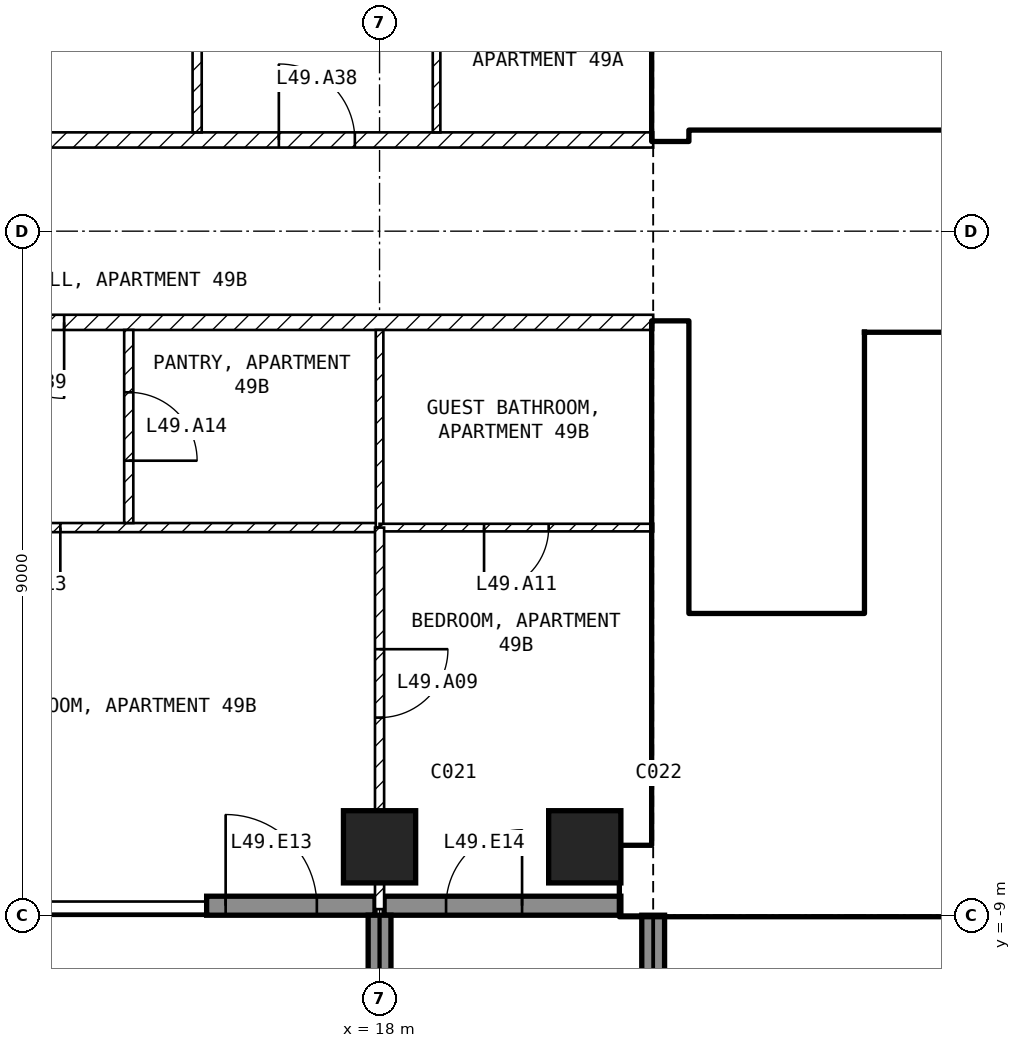
"""IFC4 building model, lengths in metres.
Left out: names, types, materials, properties, quantities, classifications, styles, units other than length and angle.
Written with IfcOpenShell. Run it as: python <this file> out.ifc"""

import sys

from ifc_helpers import new_model, si_unit, direction, frame, frame_2d, origin, origin_2d, place, context, subcontext, project, spatial, rectangle, extrude, element, fill, save


model = new_model("IFC4")
c1 = context("Model", 3, precision=1e-05, world=origin(), true_north=direction((0.0, 1.0)))
c2 = subcontext(c1, "Body", "Model", "MODEL_VIEW")
j1 = project(units=[si_unit("LENGTHUNIT", "METRE"), si_unit("PLANEANGLEUNIT", "RADIAN")], contexts=[c1])
p1 = place(None, origin())
s1 = spatial("IfcSite", under=j1, at=p1, CompositionType="ELEMENT")
p2 = place(p1, origin())
s2 = spatial("IfcBuilding", under=s1, at=p2, CompositionType="ELEMENT")
p3 = place(p2, frame((0.0, 0.0, 198.1)))
s3 = spatial("IfcBuildingStorey", under=s2, at=p3, CompositionType="ELEMENT", Elevation=198.1)
for number, where, z_axis, x_axis in (
    (1, (18.0, -8.1, -0.25), (0.0, 0.0, 1.0), (1.0, 0.0, 0.0)),
    (2, (20.7, -8.1, -0.25), (0.0, 0.0, 1.0), (1.0, 0.0, 0.0)),
):
    element("IfcColumn", number, at=place(p3, frame(where, z_axis=z_axis, x_axis=x_axis)), inside=s3, PredefinedType="COLUMN", context=c2, shape_type="SweptSolid", body=[
        extrude(rectangle(XDim=0.95, YDim=0.95, at=origin_2d()), origin(), (0.0, 0.0, 1.0), 3.5),
    ])
p4 = place(p3, frame((15.725, -8.875, 0.0), z_axis=(0.0, 0.0, 1.0), x_axis=(1.0, 0.0, 0.0)))
e3 = element("IfcWall", 3, at=p4, inside=s3, PredefinedType="SOLIDWALL", context=c2, shape_type="SweptSolid", body=[
    extrude(rectangle(XDim=2.215, YDim=0.25, at=frame_2d((1.107, 0.0))), origin(), (0.0, 0.0, 1.0), 3.25),
])
p5 = place(p4, frame((0.25, 0.0, 0.0)))
e4 = element("IfcOpeningElement", 4, at=p5, cuts=e3, PredefinedType="OPENING", context=c2, shape_type="SweptSolid", body=[
    extrude(rectangle(XDim=1.2, YDim=2.4, at=frame_2d((0.6, 1.2))), frame((0.0, 0.135, 0.0), z_axis=(0.0, -1.0, 0.0), x_axis=(1.0, 0.0, 0.0)), (0.0, 0.0, 1.0), 0.27),
])
p6 = place(p3, frame((18.06, -8.875, 0.0), z_axis=(0.0, 0.0, 1.0), x_axis=(1.0, 0.0, 0.0)))
e5 = element("IfcWall", 5, at=p6, inside=s3, PredefinedType="SOLIDWALL", context=c2, shape_type="SweptSolid", body=[
    extrude(rectangle(XDim=3.115, YDim=0.25, at=frame_2d((1.558, 0.0))), origin(), (0.0, 0.0, 1.0), 3.25),
])
p7 = place(p6, frame((0.815, 0.0, 0.0)))
e6 = element("IfcOpeningElement", 6, at=p7, cuts=e5, PredefinedType="OPENING", context=c2, shape_type="SweptSolid", body=[
    extrude(rectangle(XDim=1.0, YDim=2.4, at=frame_2d((0.5, 1.2))), frame((0.0, 0.135, 0.0), z_axis=(0.0, -1.0, 0.0), x_axis=(1.0, 0.0, 0.0)), (0.0, 0.0, 1.0), 0.27),
])
for number, where, z_axis, x_axis in (
    (7, (18.0, -9.0, 0.0), (0.0, 0.0, 1.0), (0.0, -1.0, 0.0)),
    (8, (21.6, -9.0, 0.0), (0.0, 0.0, 1.0), (0.0, -1.0, 0.0)),
):
    element("IfcWall", number, at=place(p3, frame(where, z_axis=z_axis, x_axis=x_axis)), inside=s3, PredefinedType="SOLIDWALL", context=c2, shape_type="SweptSolid", body=[
        extrude(rectangle(XDim=2.7, YDim=0.3, at=frame_2d((1.35, 0.0))), origin(), (0.0, 0.0, 1.0), 3.25),
    ])
p8 = place(p3, frame((21.175, -8.55, 0.0), z_axis=(0.0, 0.0, 1.0), x_axis=(1.0, 0.0, 0.0)))
e9 = element("IfcWall", 9, at=p8, inside=s3, PredefinedType="SHEAR", context=c2, shape_type="SweptSolid", body=[
    extrude(rectangle(XDim=9.025, YDim=0.9, at=frame_2d((4.512, 0.0))), origin(), (0.0, 0.0, 1.0), 3.25),
])
for number, where, z_axis, x_axis in (
    (10, (21.825, -8.1, 0.0), (0.0, 0.0, 1.0), (0.0, 1.0, 0.0)),
    (11, (21.825, 1.2, 0.0), (0.0, 0.0, 1.0), (0.0, 1.0, 0.0)),
):
    element("IfcWall", number, at=place(p3, frame(where, z_axis=z_axis, x_axis=x_axis)), inside=s3, PredefinedType="SHEAR", context=c2, shape_type="SweptSolid", body=[
        extrude(rectangle(XDim=6.9, YDim=0.45, at=frame_2d((3.45, 0.0))), origin(), (0.0, 0.0, 1.0), 3.25),
    ])
p9 = place(p3, frame((22.05, 1.45, 0.0), z_axis=(0.0, 0.0, 1.0), x_axis=(1.0, 0.0, 0.0)))
e12 = element("IfcWall", 12, at=p9, inside=s3, PredefinedType="SOLIDWALL", context=c2, shape_type="SweptSolid", body=[
    extrude(rectangle(XDim=11.15, YDim=0.2, at=frame_2d((5.575, 0.0))), origin(), (0.0, 0.0, 1.0), 3.25),
])
p10 = place(p9, frame((0.75, 0.0, 0.0)))
e13 = element("IfcOpeningElement", 13, at=p10, cuts=e12, PredefinedType="OPENING", context=c2, shape_type="SweptSolid", body=[
    extrude(rectangle(XDim=1.0, YDim=2.1, at=frame_2d((0.5, 1.05))), frame((0.0, 0.11, 0.0), z_axis=(0.0, -1.0, 0.0), x_axis=(1.0, 0.0, 0.0)), (0.0, 0.0, 1.0), 0.22),
])
p11 = place(p9, frame((3.25, 0.0, 0.0)))
e14 = element("IfcOpeningElement", 14, at=p11, cuts=e12, PredefinedType="OPENING", context=c2, shape_type="SweptSolid", body=[
    extrude(rectangle(XDim=1.0, YDim=2.1, at=frame_2d((0.5, 1.05))), frame((0.0, 0.11, 0.0), z_axis=(0.0, -1.0, 0.0), x_axis=(1.0, 0.0, 0.0)), (0.0, 0.0, 1.0), 0.22),
])
p12 = place(p9, frame((9.15, 0.0, 0.0)))
e15 = element("IfcOpeningElement", 15, at=p12, cuts=e12, PredefinedType="OPENING", context=c2, shape_type="SweptSolid", body=[
    extrude(rectangle(XDim=0.9, YDim=2.1, at=frame_2d((0.45, 1.05))), frame((0.0, 0.11, 0.0), z_axis=(0.0, -1.0, 0.0), x_axis=(1.0, 0.0, 0.0)), (0.0, 0.0, 1.0), 0.22),
])
p13 = place(p3, frame((24.5, -5.05, 0.0), z_axis=(0.0, 0.0, 1.0), x_axis=(0.0, 1.0, 0.0)))
e16 = element("IfcWall", 16, at=p13, inside=s3, PredefinedType="SOLIDWALL", context=c2, shape_type="SweptSolid", body=[
    extrude(rectangle(XDim=3.7, YDim=0.2, at=frame_2d((1.85, 0.0))), origin(), (0.0, 0.0, 1.0), 3.25),
])
p14 = place(p13, frame((0.1, 0.0, 0.0)))
e17 = element("IfcOpeningElement", 17, at=p14, cuts=e16, PredefinedType="OPENING", context=c2, shape_type="SweptSolid", body=[
    extrude(rectangle(XDim=0.8, YDim=2.1, at=frame_2d((0.4, 1.05))), frame((0.0, 0.11, 0.0), z_axis=(0.0, -1.0, 0.0), x_axis=(1.0, 0.0, 0.0)), (0.0, 0.0, 1.0), 0.22),
])
p15 = place(p3, frame((22.05, -5.15, 0.0), z_axis=(0.0, 0.0, 1.0), x_axis=(1.0, 0.0, 0.0)))
e18 = element("IfcWall", 18, at=p15, inside=s3, PredefinedType="SOLIDWALL", context=c2, shape_type="SweptSolid", body=[
    extrude(rectangle(XDim=6.3, YDim=0.2, at=frame_2d((3.15, 0.0))), origin(), (0.0, 0.0, 1.0), 3.25),
])
p16 = place(p15, frame((0.2, 0.0, 0.0)))
e19 = element("IfcOpeningElement", 19, at=p16, cuts=e18, PredefinedType="OPENING", context=c2, shape_type="SweptSolid", body=[
    extrude(rectangle(XDim=1.0, YDim=2.1, at=frame_2d((0.5, 1.05))), frame((0.0, 0.11, 0.0), z_axis=(0.0, -1.0, 0.0), x_axis=(1.0, 0.0, 0.0)), (0.0, 0.0, 1.0), 0.22),
])
p17 = place(p3, frame((24.6, -1.45, 0.0), z_axis=(0.0, 0.0, 1.0), x_axis=(1.0, 0.0, 0.0)))
e20 = element("IfcWall", 20, at=p17, inside=s3, PredefinedType="SOLIDWALL", context=c2, shape_type="SweptSolid", body=[
    extrude(rectangle(XDim=8.6, YDim=0.2, at=frame_2d((4.3, 0.0))), origin(), (0.0, 0.0, 1.0), 3.25),
])
p18 = place(p17, frame((0.4, 0.0, 0.0)))
e21 = element("IfcOpeningElement", 21, at=p18, cuts=e20, PredefinedType="OPENING", context=c2, shape_type="SweptSolid", body=[
    extrude(rectangle(XDim=1.0, YDim=2.1, at=frame_2d((0.5, 1.05))), frame((0.0, 0.11, 0.0), z_axis=(0.0, -1.0, 0.0), x_axis=(1.0, 0.0, 0.0)), (0.0, 0.0, 1.0), 0.22),
])
p19 = place(p17, frame((2.4, 0.0, 0.0)))
e22 = element("IfcOpeningElement", 22, at=p19, cuts=e20, PredefinedType="OPENING", context=c2, shape_type="SweptSolid", body=[
    extrude(rectangle(XDim=1.0, YDim=2.1, at=frame_2d((0.5, 1.05))), frame((0.0, 0.11, 0.0), z_axis=(0.0, -1.0, 0.0), x_axis=(1.0, 0.0, 0.0)), (0.0, 0.0, 1.0), 0.22),
])
p20 = place(p17, frame((4.4, 0.0, 0.0)))
e23 = element("IfcOpeningElement", 23, at=p20, cuts=e20, PredefinedType="OPENING", context=c2, shape_type="SweptSolid", body=[
    extrude(rectangle(XDim=1.0, YDim=2.1, at=frame_2d((0.5, 1.05))), frame((0.0, 0.11, 0.0), z_axis=(0.0, -1.0, 0.0), x_axis=(1.0, 0.0, 0.0)), (0.0, 0.0, 1.0), 0.22),
])
p21 = place(p17, frame((6.85, 0.0, 0.0)))
e24 = element("IfcOpeningElement", 24, at=p21, cuts=e20, PredefinedType="OPENING", context=c2, shape_type="SweptSolid", body=[
    extrude(rectangle(XDim=0.9, YDim=2.1, at=frame_2d((0.45, 1.05))), frame((0.0, 0.11, 0.0), z_axis=(0.0, -1.0, 0.0), x_axis=(1.0, 0.0, 0.0)), (0.0, 0.0, 1.0), 0.22),
])
p22 = place(p3, frame((24.6, -3.95, 0.0), z_axis=(0.0, 0.0, 1.0), x_axis=(1.0, 0.0, 0.0)))
e25 = element("IfcWall", 25, at=p22, inside=s3, PredefinedType="SOLIDWALL", context=c2, shape_type="SweptSolid", body=[
    extrude(rectangle(XDim=8.6, YDim=0.2, at=frame_2d((4.3, 0.0))), origin(), (0.0, 0.0, 1.0), 3.25),
])
p23 = place(p3, frame((4.4, 1.2, 0.0), z_axis=(0.0, 0.0, 1.0), x_axis=(1.0, 0.0, 0.0)))
e26 = element("IfcWall", 26, at=p23, inside=s3, PredefinedType="PARTITIONING", context=c2, shape_type="SweptSolid", body=[
    extrude(rectangle(XDim=17.2, YDim=0.2, at=frame_2d((8.6, 0.0))), origin(), (0.0, 0.0, 1.0), 3.25),
])
p24 = place(p23, frame((12.275, 0.0, 0.0)))
e27 = element("IfcOpeningElement", 27, at=p24, cuts=e26, PredefinedType="OPENING", context=c2, shape_type="SweptSolid", body=[
    extrude(rectangle(XDim=1.0, YDim=2.1, at=frame_2d((0.5, 1.05))), frame((0.0, 0.11, 0.0), z_axis=(0.0, -1.0, 0.0), x_axis=(1.0, 0.0, 0.0)), (0.0, 0.0, 1.0), 0.22),
])
p25 = place(p3, frame((21.6, -1.2, 0.0), z_axis=(0.0, 0.0, 1.0), x_axis=(-1.0, 0.0, 0.0)))
e28 = element("IfcWall", 28, at=p25, inside=s3, PredefinedType="PARTITIONING", context=c2, shape_type="SweptSolid", body=[
    extrude(rectangle(XDim=17.2, YDim=0.2, at=frame_2d((8.6, 0.0))), origin(), (0.0, 0.0, 1.0), 3.25),
])
p26 = place(p25, frame((7.75, 0.0, 0.0)))
e29 = element("IfcOpeningElement", 29, at=p26, cuts=e28, PredefinedType="OPENING", context=c2, shape_type="SweptSolid", body=[
    extrude(rectangle(XDim=1.0, YDim=2.1, at=frame_2d((0.5, 1.05))), frame((0.0, 0.11, 0.0), z_axis=(0.0, -1.0, 0.0), x_axis=(1.0, 0.0, 0.0)), (0.0, 0.0, 1.0), 0.22),
])
p27 = place(p3, frame((15.6, 4.74, 0.0), z_axis=(0.0, 0.0, 1.0), x_axis=(0.0, -1.0, 0.0)))
e30 = element("IfcWall", 30, at=p27, inside=s3, PredefinedType="PARTITIONING", context=c2, shape_type="SweptSolid", body=[
    extrude(rectangle(XDim=3.44, YDim=0.12, at=frame_2d((1.72, 0.0))), origin(), (0.0, 0.0, 1.0), 3.25),
])
p28 = place(p27, frame((1.27, 0.0, 0.0)))
e31 = element("IfcOpeningElement", 31, at=p28, cuts=e30, PredefinedType="OPENING", context=c2, shape_type="SweptSolid", body=[
    extrude(rectangle(XDim=0.9, YDim=2.1, at=frame_2d((0.45, 1.05))), frame((0.0, 0.07, 0.0), z_axis=(0.0, -1.0, 0.0), x_axis=(1.0, 0.0, 0.0)), (0.0, 0.0, 1.0), 0.14),
])
p29 = place(p3, frame((18.75, 4.74, 0.0), z_axis=(0.0, 0.0, 1.0), x_axis=(0.0, -1.0, 0.0)))
e32 = element("IfcWall", 32, at=p29, inside=s3, PredefinedType="PARTITIONING", context=c2, shape_type="SweptSolid", body=[
    extrude(rectangle(XDim=3.44, YDim=0.1, at=frame_2d((1.72, 0.0))), origin(), (0.0, 0.0, 1.0), 3.25),
])
p30 = place(p29, frame((1.295, 0.0, 0.0)))
e33 = element("IfcOpeningElement", 33, at=p30, cuts=e32, PredefinedType="OPENING", context=c2, shape_type="SweptSolid", body=[
    extrude(rectangle(XDim=0.85, YDim=2.1, at=frame_2d((0.425, 1.05))), frame((0.0, 0.06, 0.0), z_axis=(0.0, -1.0, 0.0), x_axis=(1.0, 0.0, 0.0)), (0.0, 0.0, 1.0), 0.12),
])
p31 = place(p3, frame((18.0, -3.9, 0.0), z_axis=(0.0, 0.0, 1.0), x_axis=(-1.0, 0.0, 0.0)))
e34 = element("IfcWall", 34, at=p31, inside=s3, PredefinedType="PARTITIONING", context=c2, shape_type="SweptSolid", body=[
    extrude(rectangle(XDim=9.06, YDim=0.12, at=frame_2d((4.53, 0.0))), origin(), (0.0, 0.0, 1.0), 3.25),
])
p32 = place(p31, frame((4.2, 0.0, 0.0)))
e35 = element("IfcOpeningElement", 35, at=p32, cuts=e34, PredefinedType="OPENING", context=c2, shape_type="SweptSolid", body=[
    extrude(rectangle(XDim=0.9, YDim=2.1, at=frame_2d((0.45, 1.05))), frame((0.0, 0.07, 0.0), z_axis=(0.0, -1.0, 0.0), x_axis=(1.0, 0.0, 0.0)), (0.0, 0.0, 1.0), 0.14),
])
p33 = place(p3, frame((14.7, -1.3, 0.0), z_axis=(0.0, 0.0, 1.0), x_axis=(0.0, -1.0, 0.0)))
e36 = element("IfcWall", 36, at=p33, inside=s3, PredefinedType="PARTITIONING", context=c2, shape_type="SweptSolid", body=[
    extrude(rectangle(XDim=2.54, YDim=0.12, at=frame_2d((1.27, 0.0))), origin(), (0.0, 0.0, 1.0), 3.25),
])
p34 = place(p33, frame((0.82, 0.0, 0.0)))
e37 = element("IfcOpeningElement", 37, at=p34, cuts=e36, PredefinedType="OPENING", context=c2, shape_type="SweptSolid", body=[
    extrude(rectangle(XDim=0.9, YDim=2.1, at=frame_2d((0.45, 1.05))), frame((0.0, 0.07, 0.0), z_axis=(0.0, -1.0, 0.0), x_axis=(1.0, 0.0, 0.0)), (0.0, 0.0, 1.0), 0.14),
])
p35 = place(p3, frame((18.0, -1.3, 0.0), z_axis=(0.0, 0.0, 1.0), x_axis=(0.0, -1.0, 0.0)))
e38 = element("IfcWall", 38, at=p35, inside=s3, PredefinedType="PARTITIONING", context=c2, shape_type="SweptSolid", body=[
    extrude(rectangle(XDim=2.6, YDim=0.1, at=frame_2d((1.3, 0.0))), origin(), (0.0, 0.0, 1.0), 2.48),
])
p36 = place(p3, frame((21.6, -3.9, 0.0), z_axis=(0.0, 0.0, 1.0), x_axis=(-1.0, 0.0, 0.0)))
e39 = element("IfcWall", 39, at=p36, inside=s3, PredefinedType="PARTITIONING", context=c2, shape_type="SweptSolid", body=[
    extrude(rectangle(XDim=3.6, YDim=0.1, at=frame_2d((1.8, 0.0))), origin(), (0.0, 0.0, 1.0), 3.25),
])
p37 = place(p36, frame((1.375, 0.0, 0.0)))
e40 = element("IfcOpeningElement", 40, at=p37, cuts=e39, PredefinedType="OPENING", context=c2, shape_type="SweptSolid", body=[
    extrude(rectangle(XDim=0.85, YDim=2.1, at=frame_2d((0.425, 1.05))), frame((0.0, 0.06, 0.0), z_axis=(0.0, -1.0, 0.0), x_axis=(1.0, 0.0, 0.0)), (0.0, 0.0, 1.0), 0.12),
])
p38 = place(p3, frame((18.0, -3.9, 0.0), z_axis=(0.0, 0.0, 1.0), x_axis=(0.0, -1.0, 0.0)))
e41 = element("IfcWall", 41, at=p38, inside=s3, PredefinedType="PARTITIONING", context=c2, shape_type="SweptSolid", body=[
    extrude(rectangle(XDim=5.02, YDim=0.12, at=frame_2d((2.51, 0.0))), origin(), (0.0, 0.0, 1.0), 2.48),
])
p39 = place(p38, frame((1.6, 0.0, 0.0)))
e42 = element("IfcOpeningElement", 42, at=p39, cuts=e41, PredefinedType="OPENING", context=c2, shape_type="SweptSolid", body=[
    extrude(rectangle(XDim=0.9, YDim=2.1, at=frame_2d((0.45, 1.05))), frame((0.0, 0.07, 0.0), z_axis=(0.0, -1.0, 0.0), x_axis=(1.0, 0.0, 0.0)), (0.0, 0.0, 1.0), 0.14),
])
p40 = place(p5, origin())
e43 = element("IfcDoor", 43, at=p40, inside=s3, OperationType="SINGLE_SWING_LEFT", PredefinedType="DOOR", context=c2, shape_type="SweptSolid", body=[
    extrude(rectangle(XDim=1.2, YDim=2.4, at=frame_2d((0.6, 1.2))), frame((0.0, 0.025, 0.0), z_axis=(0.0, -1.0, 0.0), x_axis=(1.0, 0.0, 0.0)), (0.0, 0.0, 1.0), 0.05),
])
fill(e4, e43)
p41 = place(p7, origin())
e44 = element("IfcDoor", 44, at=p41, inside=s3, OperationType="SINGLE_SWING_RIGHT", PredefinedType="DOOR", context=c2, shape_type="SweptSolid", body=[
    extrude(rectangle(XDim=1.0, YDim=2.4, at=frame_2d((0.5, 1.2))), frame((0.0, 0.025, 0.0), z_axis=(0.0, -1.0, 0.0), x_axis=(1.0, 0.0, 0.0)), (0.0, 0.0, 1.0), 0.05),
])
fill(e6, e44)
p42 = place(p18, origin())
e45 = element("IfcDoor", 45, at=p42, inside=s3, OperationType="DOUBLE_DOOR_SLIDING", PredefinedType="DOOR", context=c2, shape_type="SweptSolid", body=[
    extrude(rectangle(XDim=1.0, YDim=2.1, at=frame_2d((0.5, 1.05))), frame((0.0, 0.025, 0.0), z_axis=(0.0, -1.0, 0.0), x_axis=(1.0, 0.0, 0.0)), (0.0, 0.0, 1.0), 0.05),
])
fill(e21, e45)
p43 = place(p16, origin())
e46 = element("IfcDoor", 46, at=p43, inside=s3, OperationType="SINGLE_SWING_LEFT", PredefinedType="DOOR", context=c2, shape_type="SweptSolid", body=[
    extrude(rectangle(XDim=1.0, YDim=2.1, at=frame_2d((0.5, 1.05))), frame((0.0, 0.025, 0.0), z_axis=(0.0, -1.0, 0.0), x_axis=(1.0, 0.0, 0.0)), (0.0, 0.0, 1.0), 0.05),
])
fill(e19, e46)
p44 = place(p10, origin())
e47 = element("IfcDoor", 47, at=p44, inside=s3, OperationType="SINGLE_SWING_LEFT", PredefinedType="DOOR", context=c2, shape_type="SweptSolid", body=[
    extrude(rectangle(XDim=1.0, YDim=2.1, at=frame_2d((0.5, 1.05))), frame((0.0, 0.025, 0.0), z_axis=(0.0, -1.0, 0.0), x_axis=(1.0, 0.0, 0.0)), (0.0, 0.0, 1.0), 0.05),
])
fill(e13, e47)
p45 = place(p14, origin())
e48 = element("IfcDoor", 48, at=p45, inside=s3, OperationType="SINGLE_SWING_LEFT", PredefinedType="DOOR", context=c2, shape_type="SweptSolid", body=[
    extrude(rectangle(XDim=0.8, YDim=2.1, at=frame_2d((0.4, 1.05))), frame((0.0, 0.025, 0.0), z_axis=(0.0, -1.0, 0.0), x_axis=(1.0, 0.0, 0.0)), (0.0, 0.0, 1.0), 0.05),
])
fill(e17, e48)
p46 = place(p11, origin())
e49 = element("IfcDoor", 49, at=p46, inside=s3, OperationType="SINGLE_SWING_LEFT", PredefinedType="DOOR", context=c2, shape_type="SweptSolid", body=[
    extrude(rectangle(XDim=1.0, YDim=2.1, at=frame_2d((0.5, 1.05))), frame((0.0, 0.025, 0.0), z_axis=(0.0, -1.0, 0.0), x_axis=(1.0, 0.0, 0.0)), (0.0, 0.0, 1.0), 0.05),
])
fill(e14, e49)
p47 = place(p39, origin())
e50 = element("IfcDoor", 50, at=p47, inside=s3, OperationType="SINGLE_SWING_LEFT", PredefinedType="DOOR", context=c2, shape_type="SweptSolid", body=[
    extrude(rectangle(XDim=0.9, YDim=2.1, at=frame_2d((0.45, 1.05))), frame((0.0, 0.025, 0.0), z_axis=(0.0, -1.0, 0.0), x_axis=(1.0, 0.0, 0.0)), (0.0, 0.0, 1.0), 0.05),
])
fill(e42, e50)
p48 = place(p37, origin())
e51 = element("IfcDoor", 51, at=p48, inside=s3, OperationType="SINGLE_SWING_RIGHT", PredefinedType="DOOR", context=c2, shape_type="SweptSolid", body=[
    extrude(rectangle(XDim=0.85, YDim=2.1, at=frame_2d((0.425, 1.05))), frame((0.0, 0.025, 0.0), z_axis=(0.0, -1.0, 0.0), x_axis=(1.0, 0.0, 0.0)), (0.0, 0.0, 1.0), 0.05),
])
fill(e40, e51)
p49 = place(p32, origin())
e52 = element("IfcDoor", 52, at=p49, inside=s3, OperationType="SINGLE_SWING_LEFT", PredefinedType="DOOR", context=c2, shape_type="SweptSolid", body=[
    extrude(rectangle(XDim=0.9, YDim=2.1, at=frame_2d((0.45, 1.05))), frame((0.0, 0.025, 0.0), z_axis=(0.0, -1.0, 0.0), x_axis=(1.0, 0.0, 0.0)), (0.0, 0.0, 1.0), 0.05),
])
fill(e35, e52)
p50 = place(p34, origin())
e53 = element("IfcDoor", 53, at=p50, inside=s3, OperationType="SINGLE_SWING_RIGHT", PredefinedType="DOOR", context=c2, shape_type="SweptSolid", body=[
    extrude(rectangle(XDim=0.9, YDim=2.1, at=frame_2d((0.45, 1.05))), frame((0.0, 0.025, 0.0), z_axis=(0.0, -1.0, 0.0), x_axis=(1.0, 0.0, 0.0)), (0.0, 0.0, 1.0), 0.05),
])
fill(e37, e53)
p51 = place(p24, origin())
e54 = element("IfcDoor", 54, at=p51, inside=s3, OperationType="SINGLE_SWING_LEFT", PredefinedType="DOOR", context=c2, shape_type="SweptSolid", body=[
    extrude(rectangle(XDim=1.0, YDim=2.1, at=frame_2d((0.5, 1.05))), frame((0.0, 0.025, 0.0), z_axis=(0.0, -1.0, 0.0), x_axis=(1.0, 0.0, 0.0)), (0.0, 0.0, 1.0), 0.05),
])
fill(e27, e54)
p52 = place(p26, origin())
e55 = element("IfcDoor", 55, at=p52, inside=s3, OperationType="SINGLE_SWING_LEFT", PredefinedType="DOOR", context=c2, shape_type="SweptSolid", body=[
    extrude(rectangle(XDim=1.0, YDim=2.1, at=frame_2d((0.5, 1.05))), frame((0.0, 0.025, 0.0), z_axis=(0.0, -1.0, 0.0), x_axis=(1.0, 0.0, 0.0)), (0.0, 0.0, 1.0), 0.05),
])
fill(e29, e55)
save(model, sys.argv[1])
